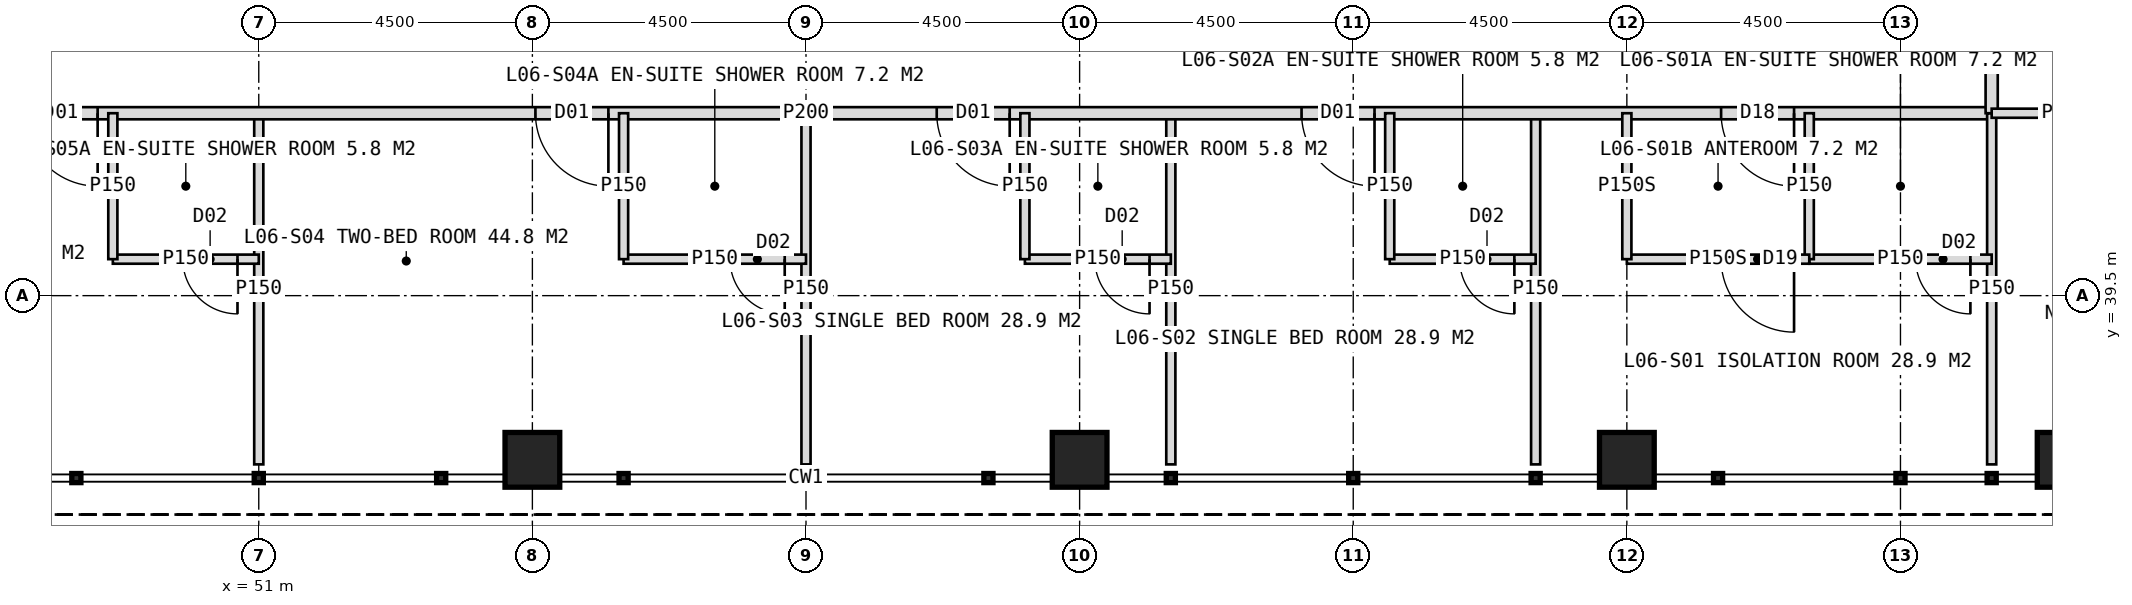
"""IFC4 building model, lengths in metres.
Left out: names, types, materials, properties, quantities, classifications, styles, units other than length and angle.
Written with IfcOpenShell. Run it as: python <this file> out.ifc"""

import sys

from ifc_helpers import new_model, si_unit, direction, frame, frame_2d, origin, origin_2d, place, context, subcontext, project, spatial, rectangle, hollow_rectangle, extrude, element, fill, save


model = new_model("IFC4")
c1 = context("Model", 3, precision=1e-05, world=origin(), true_north=direction((0.0, 1.0)))
c2 = subcontext(c1, "Body", "Model", "MODEL_VIEW")
j1 = project(units=[si_unit("LENGTHUNIT", "METRE"), si_unit("PLANEANGLEUNIT", "RADIAN")], contexts=[c1])
p1 = place(None, origin())
s1 = spatial("IfcSite", under=j1, at=p1, CompositionType="ELEMENT")
p2 = place(p1, origin())
s2 = spatial("IfcBuilding", under=s1, at=p2, CompositionType="ELEMENT")
p3 = place(p2, frame((0.0, 0.0, 31.0)))
s3 = spatial("IfcBuildingStorey", under=s2, at=p3, CompositionType="ELEMENT", Elevation=31.0)
for number, where, z_axis, x_axis in (
    (1, (55.5, 36.8, 0.0), (0.0, 0.0, 1.0), (1.0, 0.0, 0.0)),
    (2, (64.5, 36.8, 0.0), (0.0, 0.0, 1.0), (1.0, 0.0, 0.0)),
    (3, (73.5, 36.8, 0.0), (0.0, 0.0, 1.0), (1.0, 0.0, 0.0)),
    (4, (80.7, 36.8, 0.0), (0.0, 0.0, 1.0), (1.0, 0.0, 0.0)),
):
    element("IfcColumn", number, at=place(p3, frame(where, z_axis=z_axis, x_axis=x_axis)), inside=s3, PredefinedType="COLUMN", context=c2, shape_type="SweptSolid", body=[
        extrude(hollow_rectangle(XDim=0.9, YDim=0.9, WallThickness=0.08, at=origin_2d()), origin(), (0.0, 0.0, 1.0), 4.0),
    ])
for number, where, z_axis, x_axis in (
    (5, (72.0, 42.5, 0.0), (0.0, 0.0, 1.0), (0.0, -1.0, 0.0)),
    (6, (66.0, 42.5, 0.0), (0.0, 0.0, 1.0), (0.0, -1.0, 0.0)),
):
    element("IfcWall", number, at=place(p3, frame(where, z_axis=z_axis, x_axis=x_axis)), inside=s3, PredefinedType="PARTITIONING", context=c2, shape_type="SweptSolid", body=[
        extrude(rectangle(XDim=5.775, YDim=0.15, at=frame_2d((2.887, 0.0))), origin(), (0.0, 0.0, 1.0), 3.75),
    ])
p4 = place(p3, frame((60.0, 42.5, 0.0), z_axis=(0.0, 0.0, 1.0), x_axis=(0.0, -1.0, 0.0)))
e7 = element("IfcWall", 7, at=p4, inside=s3, PredefinedType="PARTITIONING", context=c2, shape_type="SweptSolid", body=[
    extrude(rectangle(XDim=5.775, YDim=0.15, at=frame_2d((2.887, 0.0))), origin(), (0.0, 0.0, 1.0), 2.75),
])
p5 = place(p3, frame((51.0, 42.5, 0.0), z_axis=(0.0, 0.0, 1.0), x_axis=(0.0, -1.0, 0.0)))
e8 = element("IfcWall", 8, at=p5, inside=s3, PredefinedType="PARTITIONING", context=c2, shape_type="SweptSolid", body=[
    extrude(rectangle(XDim=5.775, YDim=0.15, at=frame_2d((2.887, 0.0))), origin(), (0.0, 0.0, 1.0), 3.75),
])
p6 = place(p3, frame((79.5, 42.5, 0.0), z_axis=(0.0, 0.0, 1.0), x_axis=(-1.0, 0.0, 0.0)))
e9 = element("IfcWall", 9, at=p6, inside=s3, PredefinedType="PARTITIONING", context=c2, shape_type="SweptSolid", body=[
    extrude(rectangle(XDim=39.0, YDim=0.2, at=frame_2d((19.5, 0.0))), origin(), (0.0, 0.0, 1.0), 3.75),
])
p7 = place(p6, frame((3.25, 0.0, 0.0)))
e10 = element("IfcOpeningElement", 10, at=p7, cuts=e9, PredefinedType="OPENING", context=c2, shape_type="SweptSolid", body=[
    extrude(rectangle(XDim=1.2, YDim=2.2, at=frame_2d((0.6, 1.1))), frame((0.0, 0.11, 0.0), z_axis=(0.0, -1.0, 0.0), x_axis=(1.0, 0.0, 0.0)), (0.0, 0.0, 1.0), 0.22),
])
p8 = place(p6, frame((10.15, 0.0, 0.0)))
e11 = element("IfcOpeningElement", 11, at=p8, cuts=e9, PredefinedType="OPENING", context=c2, shape_type="SweptSolid", body=[
    extrude(rectangle(XDim=1.2, YDim=2.2, at=frame_2d((0.6, 1.1))), frame((0.0, 0.11, 0.0), z_axis=(0.0, -1.0, 0.0), x_axis=(1.0, 0.0, 0.0)), (0.0, 0.0, 1.0), 0.22),
])
p9 = place(p6, frame((16.15, 0.0, 0.0)))
e12 = element("IfcOpeningElement", 12, at=p9, cuts=e9, PredefinedType="OPENING", context=c2, shape_type="SweptSolid", body=[
    extrude(rectangle(XDim=1.2, YDim=2.2, at=frame_2d((0.6, 1.1))), frame((0.0, 0.11, 0.0), z_axis=(0.0, -1.0, 0.0), x_axis=(1.0, 0.0, 0.0)), (0.0, 0.0, 1.0), 0.22),
])
p10 = place(p6, frame((22.75, 0.0, 0.0)))
e13 = element("IfcOpeningElement", 13, at=p10, cuts=e9, PredefinedType="OPENING", context=c2, shape_type="SweptSolid", body=[
    extrude(rectangle(XDim=1.2, YDim=2.2, at=frame_2d((0.6, 1.1))), frame((0.0, 0.11, 0.0), z_axis=(0.0, -1.0, 0.0), x_axis=(1.0, 0.0, 0.0)), (0.0, 0.0, 1.0), 0.22),
])
p11 = place(p6, frame((31.15, 0.0, 0.0)))
e14 = element("IfcOpeningElement", 14, at=p11, cuts=e9, PredefinedType="OPENING", context=c2, shape_type="SweptSolid", body=[
    extrude(rectangle(XDim=1.2, YDim=2.2, at=frame_2d((0.6, 1.1))), frame((0.0, 0.11, 0.0), z_axis=(0.0, -1.0, 0.0), x_axis=(1.0, 0.0, 0.0)), (0.0, 0.0, 1.0), 0.22),
])
p12 = place(p3, frame((79.5, 42.5, 0.0), z_axis=(0.0, 0.0, 1.0), x_axis=(0.0, -1.0, 0.0)))
e15 = element("IfcWall", 15, at=p12, inside=s3, PredefinedType="PARTITIONING", context=c2, shape_type="SweptSolid", body=[
    extrude(rectangle(XDim=5.775, YDim=0.15, at=frame_2d((2.887, 0.0))), origin(), (0.0, 0.0, 1.0), 3.75),
])
p13 = place(p3, frame((79.5, 40.1, 0.0), z_axis=(0.0, 0.0, 1.0), x_axis=(-1.0, 0.0, 0.0)))
e16 = element("IfcWall", 16, at=p13, inside=s3, PredefinedType="PARTITIONING", context=c2, shape_type="SweptSolid", body=[
    extrude(rectangle(XDim=3.0, YDim=0.15, at=frame_2d((1.5, 0.0))), origin(), (0.0, 0.0, 1.0), 3.75),
])
p14 = place(p13, frame((0.35, 0.0, 0.0)))
e17 = element("IfcOpeningElement", 17, at=p14, cuts=e16, PredefinedType="OPENING", context=c2, shape_type="SweptSolid", body=[
    extrude(rectangle(XDim=0.9, YDim=2.1, at=frame_2d((0.45, 1.05))), frame((0.0, 0.085, 0.0), z_axis=(0.0, -1.0, 0.0), x_axis=(1.0, 0.0, 0.0)), (0.0, 0.0, 1.0), 0.17),
])
p15 = place(p3, frame((76.5, 42.5, 0.0), z_axis=(0.0, 0.0, 1.0), x_axis=(0.0, -1.0, 0.0)))
e18 = element("IfcWall", 18, at=p15, inside=s3, PredefinedType="PARTITIONING", context=c2, shape_type="SweptSolid", body=[
    extrude(rectangle(XDim=2.4, YDim=0.15, at=frame_2d((1.2, 0.0))), origin(), (0.0, 0.0, 1.0), 3.75),
])
p16 = place(p3, frame((76.5, 40.1, 0.0), z_axis=(0.0, 0.0, 1.0), x_axis=(-1.0, 0.0, 0.0)))
e19 = element("IfcWall", 19, at=p16, inside=s3, PredefinedType="PARTITIONING", context=c2, shape_type="SweptSolid", body=[
    extrude(rectangle(XDim=3.0, YDim=0.15, at=frame_2d((1.5, 0.0))), origin(), (0.0, 0.0, 1.0), 3.75),
])
p17 = place(p16, frame((0.25, 0.0, 0.0)))
e20 = element("IfcOpeningElement", 20, at=p17, cuts=e19, PredefinedType="OPENING", context=c2, shape_type="SweptSolid", body=[
    extrude(rectangle(XDim=1.2, YDim=2.2, at=frame_2d((0.6, 1.1))), frame((0.0, 0.085, 0.0), z_axis=(0.0, -1.0, 0.0), x_axis=(1.0, 0.0, 0.0)), (0.0, 0.0, 1.0), 0.17),
])
p18 = place(p3, frame((73.5, 42.5, 0.0), z_axis=(0.0, 0.0, 1.0), x_axis=(0.0, -1.0, 0.0)))
e21 = element("IfcWall", 21, at=p18, inside=s3, PredefinedType="PARTITIONING", context=c2, shape_type="SweptSolid", body=[
    extrude(rectangle(XDim=2.4, YDim=0.15, at=frame_2d((1.2, 0.0))), origin(), (0.0, 0.0, 1.0), 2.95),
])
p19 = place(p3, frame((72.0, 40.1, 0.0), z_axis=(0.0, 0.0, 1.0), x_axis=(-1.0, 0.0, 0.0)))
e22 = element("IfcWall", 22, at=p19, inside=s3, PredefinedType="PARTITIONING", context=c2, shape_type="SweptSolid", body=[
    extrude(rectangle(XDim=2.4, YDim=0.15, at=frame_2d((1.2, 0.0))), origin(), (0.0, 0.0, 1.0), 3.75),
])
p20 = place(p19, frame((0.35, 0.0, 0.0)))
e23 = element("IfcOpeningElement", 23, at=p20, cuts=e22, PredefinedType="OPENING", context=c2, shape_type="SweptSolid", body=[
    extrude(rectangle(XDim=0.9, YDim=2.1, at=frame_2d((0.45, 1.05))), frame((0.0, 0.085, 0.0), z_axis=(0.0, -1.0, 0.0), x_axis=(1.0, 0.0, 0.0)), (0.0, 0.0, 1.0), 0.17),
])
p21 = place(p3, frame((69.6, 42.5, 0.0), z_axis=(0.0, 0.0, 1.0), x_axis=(0.0, -1.0, 0.0)))
e24 = element("IfcWall", 24, at=p21, inside=s3, PredefinedType="PARTITIONING", context=c2, shape_type="SweptSolid", body=[
    extrude(rectangle(XDim=2.4, YDim=0.15, at=frame_2d((1.2, 0.0))), origin(), (0.0, 0.0, 1.0), 3.75),
])
p22 = place(p3, frame((66.0, 40.1, 0.0), z_axis=(0.0, 0.0, 1.0), x_axis=(-1.0, 0.0, 0.0)))
e25 = element("IfcWall", 25, at=p22, inside=s3, PredefinedType="PARTITIONING", context=c2, shape_type="SweptSolid", body=[
    extrude(rectangle(XDim=2.4, YDim=0.15, at=frame_2d((1.2, 0.0))), origin(), (0.0, 0.0, 1.0), 3.75),
])
p23 = place(p22, frame((0.35, 0.0, 0.0)))
e26 = element("IfcOpeningElement", 26, at=p23, cuts=e25, PredefinedType="OPENING", context=c2, shape_type="SweptSolid", body=[
    extrude(rectangle(XDim=0.9, YDim=2.1, at=frame_2d((0.45, 1.05))), frame((0.0, 0.085, 0.0), z_axis=(0.0, -1.0, 0.0), x_axis=(1.0, 0.0, 0.0)), (0.0, 0.0, 1.0), 0.17),
])
p24 = place(p3, frame((63.6, 42.5, 0.0), z_axis=(0.0, 0.0, 1.0), x_axis=(0.0, -1.0, 0.0)))
e27 = element("IfcWall", 27, at=p24, inside=s3, PredefinedType="PARTITIONING", context=c2, shape_type="SweptSolid", body=[
    extrude(rectangle(XDim=2.4, YDim=0.15, at=frame_2d((1.2, 0.0))), origin(), (0.0, 0.0, 1.0), 3.75),
])
p25 = place(p3, frame((60.0, 40.1, 0.0), z_axis=(0.0, 0.0, 1.0), x_axis=(-1.0, 0.0, 0.0)))
e28 = element("IfcWall", 28, at=p25, inside=s3, PredefinedType="PARTITIONING", context=c2, shape_type="SweptSolid", body=[
    extrude(rectangle(XDim=3.0, YDim=0.15, at=frame_2d((1.5, 0.0))), origin(), (0.0, 0.0, 1.0), 3.75),
])
p26 = place(p25, frame((0.35, 0.0, 0.0)))
e29 = element("IfcOpeningElement", 29, at=p26, cuts=e28, PredefinedType="OPENING", context=c2, shape_type="SweptSolid", body=[
    extrude(rectangle(XDim=0.9, YDim=2.1, at=frame_2d((0.45, 1.05))), frame((0.0, 0.085, 0.0), z_axis=(0.0, -1.0, 0.0), x_axis=(1.0, 0.0, 0.0)), (0.0, 0.0, 1.0), 0.17),
])
p27 = place(p3, frame((57.0, 42.5, 0.0), z_axis=(0.0, 0.0, 1.0), x_axis=(0.0, -1.0, 0.0)))
e30 = element("IfcWall", 30, at=p27, inside=s3, PredefinedType="PARTITIONING", context=c2, shape_type="SweptSolid", body=[
    extrude(rectangle(XDim=2.4, YDim=0.15, at=frame_2d((1.2, 0.0))), origin(), (0.0, 0.0, 1.0), 3.75),
])
p28 = place(p3, frame((51.0, 40.1, 0.0), z_axis=(0.0, 0.0, 1.0), x_axis=(-1.0, 0.0, 0.0)))
e31 = element("IfcWall", 31, at=p28, inside=s3, PredefinedType="PARTITIONING", context=c2, shape_type="SweptSolid", body=[
    extrude(rectangle(XDim=2.4, YDim=0.15, at=frame_2d((1.2, 0.0))), origin(), (0.0, 0.0, 1.0), 3.75),
])
p29 = place(p28, frame((0.35, 0.0, 0.0)))
e32 = element("IfcOpeningElement", 32, at=p29, cuts=e31, PredefinedType="OPENING", context=c2, shape_type="SweptSolid", body=[
    extrude(rectangle(XDim=0.9, YDim=2.1, at=frame_2d((0.45, 1.05))), frame((0.0, 0.085, 0.0), z_axis=(0.0, -1.0, 0.0), x_axis=(1.0, 0.0, 0.0)), (0.0, 0.0, 1.0), 0.17),
])
p30 = place(p3, frame((48.6, 42.5, 0.0), z_axis=(0.0, 0.0, 1.0), x_axis=(0.0, -1.0, 0.0)))
e33 = element("IfcWall", 33, at=p30, inside=s3, PredefinedType="PARTITIONING", context=c2, shape_type="SweptSolid", body=[
    extrude(rectangle(XDim=2.4, YDim=0.15, at=frame_2d((1.2, 0.0))), origin(), (0.0, 0.0, 1.0), 3.75),
])
p31 = place(p3, frame((79.5, 81.5, 0.0), z_axis=(0.0, 0.0, 1.0), x_axis=(0.0, -1.0, 0.0)))
e34 = element("IfcWall", 34, at=p31, inside=s3, PredefinedType="PARTITIONING", context=c2, shape_type="SweptSolid", body=[
    extrude(rectangle(XDim=39.0, YDim=0.2, at=frame_2d((19.5, 0.0))), origin(), (0.0, 0.0, 1.0), 3.75),
])
p32 = place(p31, frame((3.25, 0.0, 0.0)))
e35 = element("IfcOpeningElement", 35, at=p32, cuts=e34, PredefinedType="OPENING", context=c2, shape_type="SweptSolid", body=[
    extrude(rectangle(XDim=1.2, YDim=2.2, at=frame_2d((0.6, 1.1))), frame((0.0, 0.11, 0.0), z_axis=(0.0, -1.0, 0.0), x_axis=(1.0, 0.0, 0.0)), (0.0, 0.0, 1.0), 0.22),
])
p33 = place(p31, frame((10.15, 0.0, 0.0)))
e36 = element("IfcOpeningElement", 36, at=p33, cuts=e34, PredefinedType="OPENING", context=c2, shape_type="SweptSolid", body=[
    extrude(rectangle(XDim=1.2, YDim=2.2, at=frame_2d((0.6, 1.1))), frame((0.0, 0.11, 0.0), z_axis=(0.0, -1.0, 0.0), x_axis=(1.0, 0.0, 0.0)), (0.0, 0.0, 1.0), 0.22),
])
p34 = place(p31, frame((16.15, 0.0, 0.0)))
e37 = element("IfcOpeningElement", 37, at=p34, cuts=e34, PredefinedType="OPENING", context=c2, shape_type="SweptSolid", body=[
    extrude(rectangle(XDim=1.2, YDim=2.2, at=frame_2d((0.6, 1.1))), frame((0.0, 0.11, 0.0), z_axis=(0.0, -1.0, 0.0), x_axis=(1.0, 0.0, 0.0)), (0.0, 0.0, 1.0), 0.22),
])
p35 = place(p31, frame((22.75, 0.0, 0.0)))
e38 = element("IfcOpeningElement", 38, at=p35, cuts=e34, PredefinedType="OPENING", context=c2, shape_type="SweptSolid", body=[
    extrude(rectangle(XDim=1.2, YDim=2.2, at=frame_2d((0.6, 1.1))), frame((0.0, 0.11, 0.0), z_axis=(0.0, -1.0, 0.0), x_axis=(1.0, 0.0, 0.0)), (0.0, 0.0, 1.0), 0.22),
])
p36 = place(p31, frame((31.15, 0.0, 0.0)))
e39 = element("IfcOpeningElement", 39, at=p36, cuts=e34, PredefinedType="OPENING", context=c2, shape_type="SweptSolid", body=[
    extrude(rectangle(XDim=1.2, YDim=2.2, at=frame_2d((0.6, 1.1))), frame((0.0, 0.11, 0.0), z_axis=(0.0, -1.0, 0.0), x_axis=(1.0, 0.0, 0.0)), (0.0, 0.0, 1.0), 0.22),
])
p37 = place(p3, frame((79.5, 42.5, 0.0), z_axis=(0.0, 0.0, 1.0), x_axis=(1.0, 0.0, 0.0)))
e40 = element("IfcWall", 40, at=p37, inside=s3, PredefinedType="PARTITIONING", context=c2, shape_type="SweptSolid", body=[
    extrude(rectangle(XDim=2.4, YDim=0.15, at=frame_2d((1.2, 0.0))), origin(), (0.0, 0.0, 1.0), 3.75),
])
p38 = place(p17, origin())
e41 = element("IfcDoor", 41, at=p38, inside=s3, OperationType="SINGLE_SWING_LEFT", PredefinedType="DOOR", context=c2, shape_type="SweptSolid", body=[
    extrude(rectangle(XDim=1.2, YDim=2.2, at=frame_2d((0.6, 1.1))), frame((0.0, 0.025, 0.0), z_axis=(0.0, -1.0, 0.0), x_axis=(1.0, 0.0, 0.0)), (0.0, 0.0, 1.0), 0.05),
])
fill(e20, e41)
p39 = place(p7, origin())
e42 = element("IfcDoor", 42, at=p39, inside=s3, OperationType="SINGLE_SWING_LEFT", PredefinedType="DOOR", context=c2, shape_type="SweptSolid", body=[
    extrude(rectangle(XDim=1.2, YDim=2.2, at=frame_2d((0.6, 1.1))), frame((0.0, 0.025, 0.0), z_axis=(0.0, -1.0, 0.0), x_axis=(1.0, 0.0, 0.0)), (0.0, 0.0, 1.0), 0.05),
])
fill(e10, e42)
p40 = place(p14, origin())
e43 = element("IfcDoor", 43, at=p40, inside=s3, OperationType="SINGLE_SWING_LEFT", PredefinedType="DOOR", context=c2, shape_type="SweptSolid", body=[
    extrude(rectangle(XDim=0.9, YDim=2.1, at=frame_2d((0.45, 1.05))), frame((0.0, 0.025, 0.0), z_axis=(0.0, -1.0, 0.0), x_axis=(1.0, 0.0, 0.0)), (0.0, 0.0, 1.0), 0.05),
])
fill(e17, e43)
p41 = place(p8, origin())
e44 = element("IfcDoor", 44, at=p41, inside=s3, OperationType="SINGLE_SWING_LEFT", PredefinedType="DOOR", context=c2, shape_type="SweptSolid", body=[
    extrude(rectangle(XDim=1.2, YDim=2.2, at=frame_2d((0.6, 1.1))), frame((0.0, 0.025, 0.0), z_axis=(0.0, -1.0, 0.0), x_axis=(1.0, 0.0, 0.0)), (0.0, 0.0, 1.0), 0.05),
])
fill(e11, e44)
p42 = place(p20, origin())
e45 = element("IfcDoor", 45, at=p42, inside=s3, OperationType="SINGLE_SWING_LEFT", PredefinedType="DOOR", context=c2, shape_type="SweptSolid", body=[
    extrude(rectangle(XDim=0.9, YDim=2.1, at=frame_2d((0.45, 1.05))), frame((0.0, 0.025, 0.0), z_axis=(0.0, -1.0, 0.0), x_axis=(1.0, 0.0, 0.0)), (0.0, 0.0, 1.0), 0.05),
])
fill(e23, e45)
p43 = place(p9, origin())
e46 = element("IfcDoor", 46, at=p43, inside=s3, OperationType="SINGLE_SWING_LEFT", PredefinedType="DOOR", context=c2, shape_type="SweptSolid", body=[
    extrude(rectangle(XDim=1.2, YDim=2.2, at=frame_2d((0.6, 1.1))), frame((0.0, 0.025, 0.0), z_axis=(0.0, -1.0, 0.0), x_axis=(1.0, 0.0, 0.0)), (0.0, 0.0, 1.0), 0.05),
])
fill(e12, e46)
p44 = place(p23, origin())
e47 = element("IfcDoor", 47, at=p44, inside=s3, OperationType="SINGLE_SWING_LEFT", PredefinedType="DOOR", context=c2, shape_type="SweptSolid", body=[
    extrude(rectangle(XDim=0.9, YDim=2.1, at=frame_2d((0.45, 1.05))), frame((0.0, 0.025, 0.0), z_axis=(0.0, -1.0, 0.0), x_axis=(1.0, 0.0, 0.0)), (0.0, 0.0, 1.0), 0.05),
])
fill(e26, e47)
p45 = place(p10, origin())
e48 = element("IfcDoor", 48, at=p45, inside=s3, OperationType="SINGLE_SWING_LEFT", PredefinedType="DOOR", context=c2, shape_type="SweptSolid", body=[
    extrude(rectangle(XDim=1.2, YDim=2.2, at=frame_2d((0.6, 1.1))), frame((0.0, 0.025, 0.0), z_axis=(0.0, -1.0, 0.0), x_axis=(1.0, 0.0, 0.0)), (0.0, 0.0, 1.0), 0.05),
])
fill(e13, e48)
p46 = place(p26, origin())
e49 = element("IfcDoor", 49, at=p46, inside=s3, OperationType="SINGLE_SWING_LEFT", PredefinedType="DOOR", context=c2, shape_type="SweptSolid", body=[
    extrude(rectangle(XDim=0.9, YDim=2.1, at=frame_2d((0.45, 1.05))), frame((0.0, 0.025, 0.0), z_axis=(0.0, -1.0, 0.0), x_axis=(1.0, 0.0, 0.0)), (0.0, 0.0, 1.0), 0.05),
])
fill(e29, e49)
p47 = place(p11, origin())
e50 = element("IfcDoor", 50, at=p47, inside=s3, OperationType="SINGLE_SWING_LEFT", PredefinedType="DOOR", context=c2, shape_type="SweptSolid", body=[
    extrude(rectangle(XDim=1.2, YDim=2.2, at=frame_2d((0.6, 1.1))), frame((0.0, 0.025, 0.0), z_axis=(0.0, -1.0, 0.0), x_axis=(1.0, 0.0, 0.0)), (0.0, 0.0, 1.0), 0.05),
])
fill(e14, e50)
p48 = place(p29, origin())
e51 = element("IfcDoor", 51, at=p48, inside=s3, OperationType="SINGLE_SWING_LEFT", PredefinedType="DOOR", context=c2, shape_type="SweptSolid", body=[
    extrude(rectangle(XDim=0.9, YDim=2.1, at=frame_2d((0.45, 1.05))), frame((0.0, 0.025, 0.0), z_axis=(0.0, -1.0, 0.0), x_axis=(1.0, 0.0, 0.0)), (0.0, 0.0, 1.0), 0.05),
])
fill(e32, e51)
save(model, sys.argv[1])
